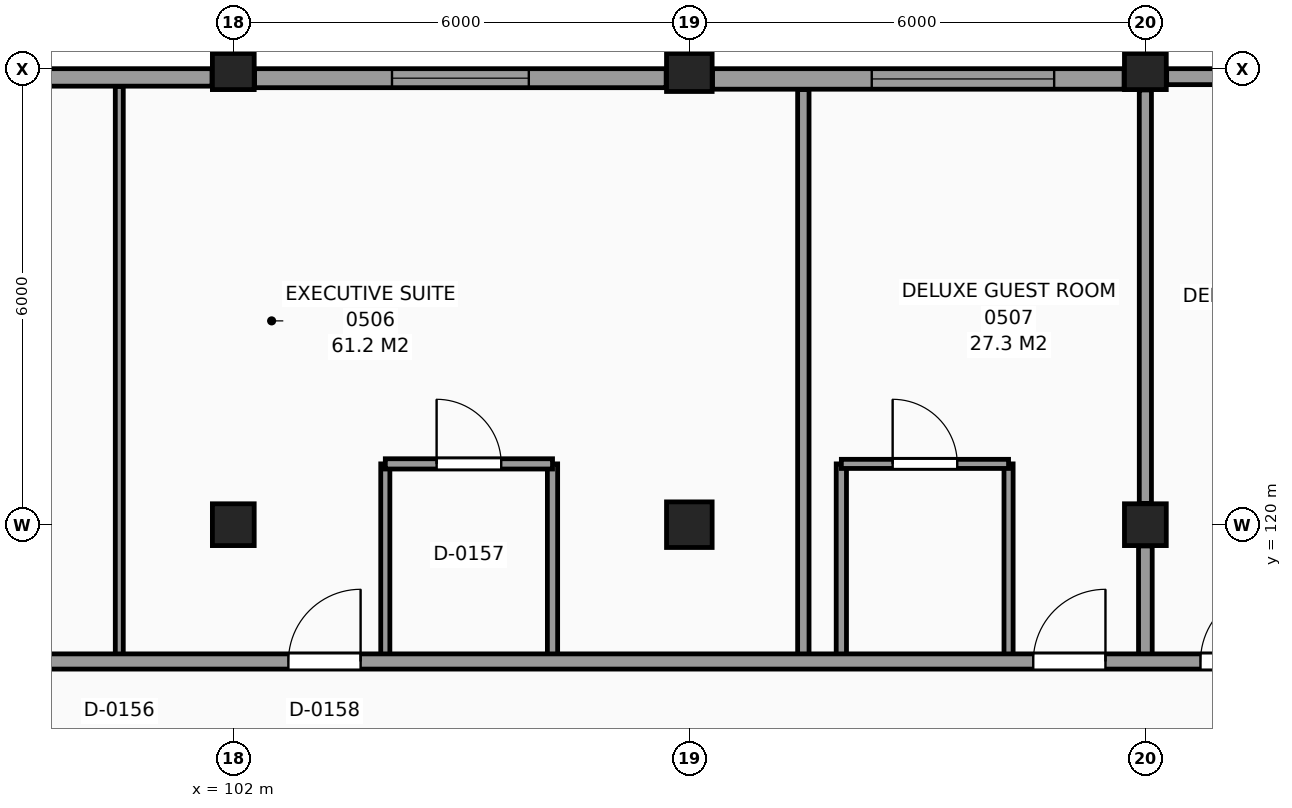
"""IFC4 building model, lengths in metres.
Left out: names, types, materials, properties, quantities, classifications, styles, units other than length and angle.
Written with IfcOpenShell. Run it as: python <this file> out.ifc"""

import sys

from ifc_helpers import new_model, si_unit, direction, frame, frame_2d, origin, origin_2d, place, context, subcontext, project, spatial, rectangle, extrude, element, fill, save


model = new_model("IFC4")
c1 = context("Model", 3, precision=1e-05, world=origin(), true_north=direction((0.0, 1.0)))
c2 = subcontext(c1, "Body", "Model", "MODEL_VIEW")
j1 = project(units=[si_unit("LENGTHUNIT", "METRE"), si_unit("PLANEANGLEUNIT", "RADIAN")], contexts=[c1])
p1 = place(None, origin())
s1 = spatial("IfcSite", under=j1, at=p1, CompositionType="ELEMENT")
p2 = place(p1, origin())
s2 = spatial("IfcBuilding", under=s1, at=p2, CompositionType="ELEMENT")
p3 = place(p2, frame((0.0, 0.0, 24.6)))
s3 = spatial("IfcBuildingStorey", under=s2, at=p3, CompositionType="ELEMENT", Elevation=24.6)
for number, where, z_axis, x_axis in (
    (1, (102.0, 120.0, 0.0), (0.0, 0.0, 1.0), (1.0, 0.0, 0.0)),
    (2, (102.0, 126.0, 0.0), (0.0, 0.0, 1.0), (1.0, 0.0, 0.0)),
):
    element("IfcColumn", number, at=place(p3, frame(where, z_axis=z_axis, x_axis=x_axis)), inside=s3, PredefinedType="COLUMN", context=c2, shape_type="SweptSolid", body=[
        extrude(rectangle(XDim=0.55, YDim=0.55, at=origin_2d()), origin(), (0.0, 0.0, 1.0), 3.6),
    ])
for number, where, z_axis, x_axis in (
    (3, (108.0, 120.0, 0.0), (0.0, 0.0, 1.0), (1.0, 0.0, 0.0)),
    (4, (108.0, 126.0, 0.0), (0.0, 0.0, 1.0), (1.0, 0.0, 0.0)),
):
    element("IfcColumn", number, at=place(p3, frame(where, z_axis=z_axis, x_axis=x_axis)), inside=s3, PredefinedType="COLUMN", context=c2, shape_type="SweptSolid", body=[
        extrude(rectangle(XDim=0.6, YDim=0.6, at=origin_2d()), origin(), (0.0, 0.0, 1.0), 3.6),
    ])
for number, where, z_axis, x_axis in (
    (5, (114.0, 120.0, 0.0), (0.0, 0.0, 1.0), (1.0, 0.0, 0.0)),
    (6, (114.0, 126.0, 0.0), (0.0, 0.0, 1.0), (1.0, 0.0, 0.0)),
):
    element("IfcColumn", number, at=place(p3, frame(where, z_axis=z_axis, x_axis=x_axis)), inside=s3, PredefinedType="COLUMN", context=c2, shape_type="SweptSolid", body=[
        extrude(rectangle(XDim=0.55, YDim=0.55, at=origin_2d()), origin(), (0.0, 0.0, 1.0), 3.6),
    ])
p4 = place(p3, frame((119.695, 125.895, 0.0), z_axis=(0.0, 0.0, 1.0), x_axis=(-1.0, 0.0, 0.0)))
e7 = element("IfcWall", 7, at=p4, inside=s3, PredefinedType="SOLIDWALL", context=c2, shape_type="SweptSolid", body=[
    extrude(rectangle(XDim=5.415, YDim=0.21, at=frame_2d((2.708, 0.0))), origin(), (0.0, 0.0, 1.0), 2.73),
])
p5 = place(p4, frame((2.095, 0.0, 0.8)))
e8 = element("IfcOpeningElement", 8, at=p5, cuts=e7, PredefinedType="OPENING", context=c2, shape_type="SweptSolid", body=[
    extrude(rectangle(XDim=2.4, YDim=1.75, at=frame_2d((1.2, 0.875))), frame((0.0, 0.115, 0.0), z_axis=(0.0, -1.0, 0.0), x_axis=(1.0, 0.0, 0.0)), (0.0, 0.0, 1.0), 0.23),
])
p6 = place(p3, frame((113.72, 125.865, 0.0), z_axis=(0.0, 0.0, 1.0), x_axis=(-1.0, 0.0, 0.0)))
e9 = element("IfcWall", 9, at=p6, inside=s3, PredefinedType="SOLIDWALL", context=c2, shape_type="SweptSolid", body=[
    extrude(rectangle(XDim=5.415, YDim=0.27, at=frame_2d((2.708, 0.0))), origin(), (0.0, 0.0, 1.0), 2.73),
])
p7 = place(p6, frame((0.92, 0.0, 0.8)))
e10 = element("IfcOpeningElement", 10, at=p7, cuts=e9, PredefinedType="OPENING", context=c2, shape_type="SweptSolid", body=[
    extrude(rectangle(XDim=2.4, YDim=1.75, at=frame_2d((1.2, 0.875))), frame((0.0, 0.145, 0.0), z_axis=(0.0, -1.0, 0.0), x_axis=(1.0, 0.0, 0.0)), (0.0, 0.0, 1.0), 0.29),
])
p8 = place(p3, frame((107.695, 125.875, 0.0), z_axis=(0.0, 0.0, 1.0), x_axis=(-1.0, 0.0, 0.0)))
e11 = element("IfcWall", 11, at=p8, inside=s3, PredefinedType="SOLIDWALL", context=c2, shape_type="SweptSolid", body=[
    extrude(rectangle(XDim=5.415, YDim=0.25, at=frame_2d((2.708, 0.0))), origin(), (0.0, 0.0, 1.0), 2.73),
])
p9 = place(p8, frame((1.807, 0.0, 0.8)))
e12 = element("IfcOpeningElement", 12, at=p9, cuts=e11, PredefinedType="OPENING", context=c2, shape_type="SweptSolid", body=[
    extrude(rectangle(XDim=1.8, YDim=1.7, at=frame_2d((0.9, 0.85))), frame((0.0, 0.135, 0.0), z_axis=(0.0, -1.0, 0.0), x_axis=(1.0, 0.0, 0.0)), (0.0, 0.0, 1.0), 0.27),
])
p10 = place(p3, frame((101.72, 125.885, 0.0), z_axis=(0.0, 0.0, 1.0), x_axis=(-1.0, 0.0, 0.0)))
e13 = element("IfcWall", 13, at=p10, inside=s3, PredefinedType="SOLIDWALL", context=c2, shape_type="SweptSolid", body=[
    extrude(rectangle(XDim=5.415, YDim=0.23, at=frame_2d((2.708, 0.0))), origin(), (0.0, 0.0, 1.0), 2.73),
])
p11 = place(p3, frame((100.5, 118.2, 0.0), z_axis=(0.0, 0.0, 1.0), x_axis=(0.0, 1.0, 0.0)))
e14 = element("IfcWall", 14, at=p11, inside=s3, PredefinedType="PARTITIONING", context=c2, shape_type="SweptSolid", body=[
    extrude(rectangle(XDim=7.565, YDim=0.105, at=frame_2d((3.782, 0.0))), origin(), (0.0, 0.0, 1.0), 3.38),
])
p12 = place(p3, frame((104.0, 118.2, 0.0), z_axis=(0.0, 0.0, 1.0), x_axis=(0.0, 1.0, 0.0)))
e15 = element("IfcWall", 15, at=p12, inside=s3, PredefinedType="PARTITIONING", context=c2, shape_type="SweptSolid", body=[
    extrude(rectangle(XDim=2.6, YDim=0.12, at=frame_2d((1.3, 0.0))), origin(), (0.0, 0.0, 1.0), 3.38),
])
p13 = place(p3, frame((106.2, 118.2, 0.0), z_axis=(0.0, 0.0, 1.0), x_axis=(0.0, 1.0, 0.0)))
e16 = element("IfcWall", 16, at=p13, inside=s3, PredefinedType="PARTITIONING", context=c2, shape_type="SweptSolid", body=[
    extrude(rectangle(XDim=2.6, YDim=0.135, at=frame_2d((1.3, 0.0))), origin(), (0.0, 0.0, 1.0), 3.38),
])
p14 = place(p3, frame((109.5, 118.2, 0.0), z_axis=(0.0, 0.0, 1.0), x_axis=(0.0, 1.0, 0.0)))
e17 = element("IfcWall", 17, at=p14, inside=s3, PredefinedType="PARTITIONING", context=c2, shape_type="SweptSolid", body=[
    extrude(rectangle(XDim=7.525, YDim=0.15, at=frame_2d((3.763, 0.0))), origin(), (0.0, 0.0, 1.0), 3.38),
])
p15 = place(p3, frame((110.0, 118.2, 0.0), z_axis=(0.0, 0.0, 1.0), x_axis=(0.0, 1.0, 0.0)))
e18 = element("IfcWall", 18, at=p15, inside=s3, PredefinedType="PARTITIONING", context=c2, shape_type="SweptSolid", body=[
    extrude(rectangle(XDim=2.6, YDim=0.135, at=frame_2d((1.3, 0.0))), origin(), (0.0, 0.0, 1.0), 3.38),
])
p16 = place(p3, frame((112.2, 118.2, 0.0), z_axis=(0.0, 0.0, 1.0), x_axis=(0.0, 1.0, 0.0)))
e19 = element("IfcWall", 19, at=p16, inside=s3, PredefinedType="PARTITIONING", context=c2, shape_type="SweptSolid", body=[
    extrude(rectangle(XDim=2.6, YDim=0.12, at=frame_2d((1.3, 0.0))), origin(), (0.0, 0.0, 1.0), 3.38),
])
p17 = place(p3, frame((114.0, 118.2, 0.0), z_axis=(0.0, 0.0, 1.0), x_axis=(0.0, 1.0, 0.0)))
e20 = element("IfcWall", 20, at=p17, inside=s3, PredefinedType="PARTITIONING", context=c2, shape_type="SweptSolid", body=[
    extrude(rectangle(XDim=1.52, YDim=0.18, at=frame_2d((0.76, 0.0))), origin(), (0.0, 0.0, 1.0), 2.58),
])
p18 = place(p3, frame((114.0, 120.28, 0.0), z_axis=(0.0, 0.0, 1.0), x_axis=(0.0, 1.0, 0.0)))
e21 = element("IfcWall", 21, at=p18, inside=s3, PredefinedType="PARTITIONING", context=c2, shape_type="SweptSolid", body=[
    extrude(rectangle(XDim=5.44, YDim=0.16, at=frame_2d((2.72, 0.0))), origin(), (0.0, 0.0, 1.0), 2.68),
])
p19 = place(p3, frame((66.255, 118.2, 0.0), z_axis=(0.0, 0.0, 1.0), x_axis=(1.0, 0.0, 0.0)))
e22 = element("IfcWall", 22, at=p19, inside=s3, PredefinedType="PARTITIONING", context=c2, shape_type="SweptSolid", body=[
    extrude(rectangle(XDim=110.245, YDim=0.2, at=frame_2d((55.123, 0.0))), origin(), (0.0, 0.0, 1.0), 3.38),
])
p20 = place(p19, frame((7.57, 0.0, 0.0)))
e23 = element("IfcOpeningElement", 23, at=p20, cuts=e22, PredefinedType="OPENING", context=c2, shape_type="SweptSolid", body=[
    extrude(rectangle(XDim=0.95, YDim=2.1, at=frame_2d((0.475, 1.05))), frame((0.0, 0.11, 0.0), z_axis=(0.0, -1.0, 0.0), x_axis=(1.0, 0.0, 0.0)), (0.0, 0.0, 1.0), 0.22),
])
p21 = place(p19, frame((12.07, 0.0, 0.0)))
e24 = element("IfcOpeningElement", 24, at=p21, cuts=e22, PredefinedType="OPENING", context=c2, shape_type="SweptSolid", body=[
    extrude(rectangle(XDim=0.95, YDim=2.1, at=frame_2d((0.475, 1.05))), frame((0.0, 0.11, 0.0), z_axis=(0.0, -1.0, 0.0), x_axis=(1.0, 0.0, 0.0)), (0.0, 0.0, 1.0), 0.22),
])
p22 = place(p19, frame((16.27, 0.0, 0.0)))
e25 = element("IfcOpeningElement", 25, at=p22, cuts=e22, PredefinedType="OPENING", context=c2, shape_type="SweptSolid", body=[
    extrude(rectangle(XDim=0.95, YDim=2.1, at=frame_2d((0.475, 1.05))), frame((0.0, 0.11, 0.0), z_axis=(0.0, -1.0, 0.0), x_axis=(1.0, 0.0, 0.0)), (0.0, 0.0, 1.0), 0.22),
])
p23 = place(p19, frame((18.47, 0.0, 0.0)))
e26 = element("IfcOpeningElement", 26, at=p23, cuts=e22, PredefinedType="OPENING", context=c2, shape_type="SweptSolid", body=[
    extrude(rectangle(XDim=0.95, YDim=2.1, at=frame_2d((0.475, 1.05))), frame((0.0, 0.11, 0.0), z_axis=(0.0, -1.0, 0.0), x_axis=(1.0, 0.0, 0.0)), (0.0, 0.0, 1.0), 0.22),
])
p24 = place(p19, frame((32.32, 0.0, 0.0)))
e27 = element("IfcOpeningElement", 27, at=p24, cuts=e22, PredefinedType="OPENING", context=c2, shape_type="SweptSolid", body=[
    extrude(rectangle(XDim=0.95, YDim=2.1, at=frame_2d((0.475, 1.05))), frame((0.0, 0.11, 0.0), z_axis=(0.0, -1.0, 0.0), x_axis=(1.0, 0.0, 0.0)), (0.0, 0.0, 1.0), 0.22),
])
p25 = place(p19, frame((36.47, 0.0, 0.0)))
e28 = element("IfcOpeningElement", 28, at=p25, cuts=e22, PredefinedType="OPENING", context=c2, shape_type="SweptSolid", body=[
    extrude(rectangle(XDim=0.95, YDim=2.1, at=frame_2d((0.475, 1.05))), frame((0.0, 0.11, 0.0), z_axis=(0.0, -1.0, 0.0), x_axis=(1.0, 0.0, 0.0)), (0.0, 0.0, 1.0), 0.22),
])
p26 = place(p19, frame((46.27, 0.0, 0.0)))
e29 = element("IfcOpeningElement", 29, at=p26, cuts=e22, PredefinedType="OPENING", context=c2, shape_type="SweptSolid", body=[
    extrude(rectangle(XDim=0.95, YDim=2.1, at=frame_2d((0.475, 1.05))), frame((0.0, 0.11, 0.0), z_axis=(0.0, -1.0, 0.0), x_axis=(1.0, 0.0, 0.0)), (0.0, 0.0, 1.0), 0.22),
])
p27 = place(p19, frame((48.47, 0.0, 0.0)))
e30 = element("IfcOpeningElement", 30, at=p27, cuts=e22, PredefinedType="OPENING", context=c2, shape_type="SweptSolid", body=[
    extrude(rectangle(XDim=0.95, YDim=2.1, at=frame_2d((0.475, 1.05))), frame((0.0, 0.11, 0.0), z_axis=(0.0, -1.0, 0.0), x_axis=(1.0, 0.0, 0.0)), (0.0, 0.0, 1.0), 0.22),
])
p28 = place(p19, frame((52.87, 0.0, 0.0)))
e31 = element("IfcOpeningElement", 31, at=p28, cuts=e22, PredefinedType="OPENING", context=c2, shape_type="SweptSolid", body=[
    extrude(rectangle(XDim=0.95, YDim=2.1, at=frame_2d((0.475, 1.05))), frame((0.0, 0.11, 0.0), z_axis=(0.0, -1.0, 0.0), x_axis=(1.0, 0.0, 0.0)), (0.0, 0.0, 1.0), 0.22),
])
p29 = place(p19, frame((60.07, 0.0, 0.0)))
e32 = element("IfcOpeningElement", 32, at=p29, cuts=e22, PredefinedType="OPENING", context=c2, shape_type="SweptSolid", body=[
    extrude(rectangle(XDim=0.95, YDim=2.1, at=frame_2d((0.475, 1.05))), frame((0.0, 0.11, 0.0), z_axis=(0.0, -1.0, 0.0), x_axis=(1.0, 0.0, 0.0)), (0.0, 0.0, 1.0), 0.22),
])
p30 = place(p19, frame((68.32, 0.0, 0.0)))
e33 = element("IfcOpeningElement", 33, at=p30, cuts=e22, PredefinedType="OPENING", context=c2, shape_type="SweptSolid", body=[
    extrude(rectangle(XDim=0.95, YDim=2.1, at=frame_2d((0.475, 1.05))), frame((0.0, 0.11, 0.0), z_axis=(0.0, -1.0, 0.0), x_axis=(1.0, 0.0, 0.0)), (0.0, 0.0, 1.0), 0.22),
])
p31 = place(p19, frame((80.32, 0.0, 0.0)))
e34 = element("IfcOpeningElement", 34, at=p31, cuts=e22, PredefinedType="OPENING", context=c2, shape_type="SweptSolid", body=[
    extrude(rectangle(XDim=0.95, YDim=2.1, at=frame_2d((0.475, 1.05))), frame((0.0, 0.11, 0.0), z_axis=(0.0, -1.0, 0.0), x_axis=(1.0, 0.0, 0.0)), (0.0, 0.0, 1.0), 0.22),
])
p32 = place(p19, frame((82.87, 0.0, 0.0)))
e35 = element("IfcOpeningElement", 35, at=p32, cuts=e22, PredefinedType="OPENING", context=c2, shape_type="SweptSolid", body=[
    extrude(rectangle(XDim=0.95, YDim=2.1, at=frame_2d((0.475, 1.05))), frame((0.0, 0.11, 0.0), z_axis=(0.0, -1.0, 0.0), x_axis=(1.0, 0.0, 0.0)), (0.0, 0.0, 1.0), 0.22),
])
p33 = place(p19, frame((90.07, 0.0, 0.0)))
e36 = element("IfcOpeningElement", 36, at=p33, cuts=e22, PredefinedType="OPENING", context=c2, shape_type="SweptSolid", body=[
    extrude(rectangle(XDim=0.95, YDim=2.1, at=frame_2d((0.475, 1.05))), frame((0.0, 0.11, 0.0), z_axis=(0.0, -1.0, 0.0), x_axis=(1.0, 0.0, 0.0)), (0.0, 0.0, 1.0), 0.22),
])
p34 = place(p19, frame((94.27, 0.0, 0.0)))
e37 = element("IfcOpeningElement", 37, at=p34, cuts=e22, PredefinedType="OPENING", context=c2, shape_type="SweptSolid", body=[
    extrude(rectangle(XDim=0.95, YDim=2.1, at=frame_2d((0.475, 1.05))), frame((0.0, 0.11, 0.0), z_axis=(0.0, -1.0, 0.0), x_axis=(1.0, 0.0, 0.0)), (0.0, 0.0, 1.0), 0.22),
])
p35 = place(p19, frame((103.57, 0.0, 0.0)))
e38 = element("IfcOpeningElement", 38, at=p35, cuts=e22, PredefinedType="OPENING", context=c2, shape_type="SweptSolid", body=[
    extrude(rectangle(XDim=0.95, YDim=2.1, at=frame_2d((0.475, 1.05))), frame((0.0, 0.11, 0.0), z_axis=(0.0, -1.0, 0.0), x_axis=(1.0, 0.0, 0.0)), (0.0, 0.0, 1.0), 0.22),
])
p36 = place(p19, frame((104.97, 0.0, 0.0)))
e39 = element("IfcOpeningElement", 39, at=p36, cuts=e22, PredefinedType="OPENING", context=c2, shape_type="SweptSolid", body=[
    extrude(rectangle(XDim=0.95, YDim=2.1, at=frame_2d((0.475, 1.05))), frame((0.0, 0.11, 0.0), z_axis=(0.0, -1.0, 0.0), x_axis=(1.0, 0.0, 0.0)), (0.0, 0.0, 1.0), 0.22),
])
p37 = place(p3, frame((104.0, 120.8, 0.0), z_axis=(0.0, 0.0, 1.0), x_axis=(1.0, 0.0, 0.0)))
e40 = element("IfcWall", 40, at=p37, inside=s3, PredefinedType="PARTITIONING", context=c2, shape_type="SweptSolid", body=[
    extrude(rectangle(XDim=2.2, YDim=0.135, at=frame_2d((1.1, 0.0))), origin(), (0.0, 0.0, 1.0), 3.38),
])
p38 = place(p37, frame((0.675, 0.0, 0.0)))
e41 = element("IfcOpeningElement", 41, at=p38, cuts=e40, PredefinedType="OPENING", context=c2, shape_type="SweptSolid", body=[
    extrude(rectangle(XDim=0.85, YDim=2.1, at=frame_2d((0.425, 1.05))), frame((0.0, 0.078, 0.0), z_axis=(0.0, -1.0, 0.0), x_axis=(1.0, 0.0, 0.0)), (0.0, 0.0, 1.0), 0.155),
])
p39 = place(p3, frame((110.0, 120.8, 0.0), z_axis=(0.0, 0.0, 1.0), x_axis=(1.0, 0.0, 0.0)))
e42 = element("IfcWall", 42, at=p39, inside=s3, PredefinedType="PARTITIONING", context=c2, shape_type="SweptSolid", body=[
    extrude(rectangle(XDim=2.2, YDim=0.12, at=frame_2d((1.1, 0.0))), origin(), (0.0, 0.0, 1.0), 3.38),
])
p40 = place(p39, frame((0.675, 0.0, 0.0)))
e43 = element("IfcOpeningElement", 43, at=p40, cuts=e42, PredefinedType="OPENING", context=c2, shape_type="SweptSolid", body=[
    extrude(rectangle(XDim=0.85, YDim=2.1, at=frame_2d((0.425, 1.05))), frame((0.0, 0.07, 0.0), z_axis=(0.0, -1.0, 0.0), x_axis=(1.0, 0.0, 0.0)), (0.0, 0.0, 1.0), 0.14),
])
p41 = place(p9, origin())
e44 = element("IfcWindow", 44, at=p41, inside=s3, PartitioningType="SINGLE_PANEL", PredefinedType="WINDOW", context=c2, shape_type="SweptSolid", body=[
    extrude(rectangle(XDim=1.8, YDim=1.7, at=frame_2d((0.9, 0.85))), frame((0.0, 0.03, 0.0), z_axis=(0.0, -1.0, 0.0), x_axis=(1.0, 0.0, 0.0)), (0.0, 0.0, 1.0), 0.06),
])
fill(e12, e44)
p42 = place(p7, origin())
e45 = element("IfcWindow", 45, at=p42, inside=s3, PartitioningType="SINGLE_PANEL", PredefinedType="WINDOW", context=c2, shape_type="SweptSolid", body=[
    extrude(rectangle(XDim=2.4, YDim=1.75, at=frame_2d((1.2, 0.875))), frame((0.0, 0.03, 0.0), z_axis=(0.0, -1.0, 0.0), x_axis=(1.0, 0.0, 0.0)), (0.0, 0.0, 1.0), 0.06),
])
fill(e10, e45)
p43 = place(p38, origin())
e46 = element("IfcDoor", 46, at=p43, inside=s3, OperationType="SINGLE_SWING_LEFT", PredefinedType="DOOR", context=c2, shape_type="SweptSolid", body=[
    extrude(rectangle(XDim=0.85, YDim=2.1, at=frame_2d((0.425, 1.05))), frame((0.0, 0.025, 0.0), z_axis=(0.0, -1.0, 0.0), x_axis=(1.0, 0.0, 0.0)), (0.0, 0.0, 1.0), 0.05),
])
fill(e41, e46)
p44 = place(p25, origin())
e47 = element("IfcDoor", 47, at=p44, inside=s3, OperationType="SINGLE_SWING_RIGHT", PredefinedType="DOOR", context=c2, shape_type="SweptSolid", body=[
    extrude(rectangle(XDim=0.95, YDim=2.1, at=frame_2d((0.475, 1.05))), frame((0.0, 0.025, 0.0), z_axis=(0.0, -1.0, 0.0), x_axis=(1.0, 0.0, 0.0)), (0.0, 0.0, 1.0), 0.05),
])
fill(e28, e47)
p45 = place(p40, origin())
e48 = element("IfcDoor", 48, at=p45, inside=s3, OperationType="SINGLE_SWING_LEFT", PredefinedType="DOOR", context=c2, shape_type="SweptSolid", body=[
    extrude(rectangle(XDim=0.85, YDim=2.1, at=frame_2d((0.425, 1.05))), frame((0.0, 0.025, 0.0), z_axis=(0.0, -1.0, 0.0), x_axis=(1.0, 0.0, 0.0)), (0.0, 0.0, 1.0), 0.05),
])
fill(e43, e48)
p46 = place(p26, origin())
e49 = element("IfcDoor", 49, at=p46, inside=s3, OperationType="SINGLE_SWING_RIGHT", PredefinedType="DOOR", context=c2, shape_type="SweptSolid", body=[
    extrude(rectangle(XDim=0.95, YDim=2.1, at=frame_2d((0.475, 1.05))), frame((0.0, 0.025, 0.0), z_axis=(0.0, -1.0, 0.0), x_axis=(1.0, 0.0, 0.0)), (0.0, 0.0, 1.0), 0.05),
])
fill(e29, e49)
p47 = place(p27, origin())
e50 = element("IfcDoor", 50, at=p47, inside=s3, OperationType="SINGLE_SWING_RIGHT", PredefinedType="DOOR", context=c2, shape_type="SweptSolid", body=[
    extrude(rectangle(XDim=0.95, YDim=2.1, at=frame_2d((0.475, 1.05))), frame((0.0, 0.025, 0.0), z_axis=(0.0, -1.0, 0.0), x_axis=(1.0, 0.0, 0.0)), (0.0, 0.0, 1.0), 0.05),
])
fill(e30, e50)
save(model, sys.argv[1])
